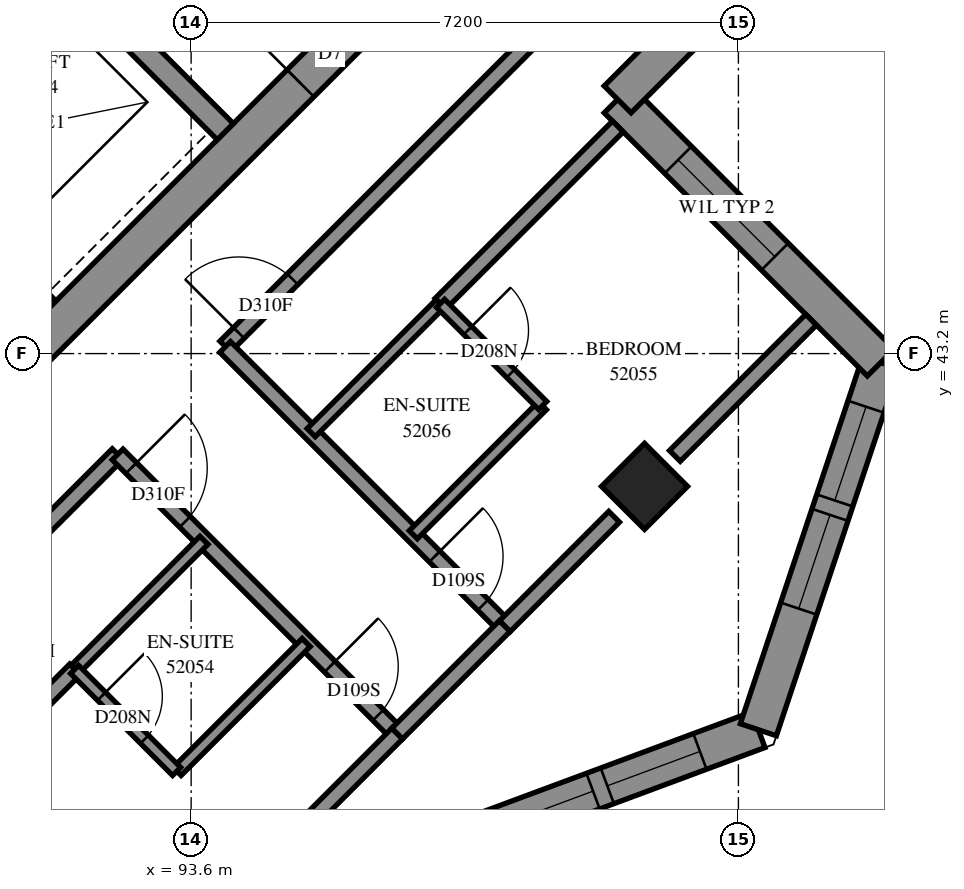
"""IFC4 building model, lengths in metres.
Left out: names, types, materials, properties, quantities, classifications, styles, units other than length and angle.
Written with IfcOpenShell. Run it as: python <this file> out.ifc"""

import sys

from ifc_helpers import new_model, si_unit, direction, frame, frame_2d, origin, origin_2d, place, context, subcontext, project, spatial, polyline, rectangle, outline, extrude, element, fill, save


model = new_model("IFC4")
c1 = context("Model", 3, precision=1e-05, world=origin(), true_north=direction((0.0, 1.0)))
c2 = subcontext(c1, "Body", "Model", "MODEL_VIEW")
j1 = project(units=[si_unit("LENGTHUNIT", "METRE"), si_unit("PLANEANGLEUNIT", "RADIAN")], contexts=[c1])
p1 = place(None, origin())
s1 = spatial("IfcSite", under=j1, at=p1, CompositionType="ELEMENT")
p2 = place(p1, origin())
s2 = spatial("IfcBuilding", under=s1, at=p2, CompositionType="ELEMENT")
p3 = place(p2, frame((0.0, 0.0, 193.0)))
s3 = spatial("IfcBuildingStorey", under=s2, at=p3, CompositionType="ELEMENT", Elevation=193.0)
p4 = place(p3, frame((99.565, 41.453, 0.0), z_axis=(0.0, 0.0, 1.0), x_axis=(0.7071067812, -0.7071067812, 0.0)))
e1 = element("IfcColumn", 1, at=p4, inside=s3, PredefinedType="COLUMN", context=c2, shape_type="SweptSolid", body=[
    extrude(rectangle(XDim=0.8, YDim=0.8, at=origin_2d()), origin(), (0.0, 0.0, 1.0), 3.1),
])
p5 = place(p3, frame((87.013, 38.731, -0.3), z_axis=(0.0, 0.0, 1.0), x_axis=(0.7071067812, 0.7071067812, 0.0)))
e2 = element("IfcWall", 2, at=p5, inside=s3, PredefinedType="SHEAR", context=c2, shape_type="SweptSolid", body=[
    extrude(rectangle(XDim=14.4, YDim=0.5, at=frame_2d((7.2, 0.0))), origin(), (0.0, 0.0, 1.0), 2.7),
])
p6 = place(p5, frame((4.55, 0.0, 0.3)))
e3 = element("IfcOpeningElement", 3, at=p6, cuts=e2, PredefinedType="OPENING", context=c2, shape_type="SweptSolid", body=[
    extrude(rectangle(XDim=1.1, YDim=2.1, at=frame_2d((0.55, 1.05))), frame((0.0, 0.26, 0.0), z_axis=(0.0, -1.0, 0.0), x_axis=(1.0, 0.0, 0.0)), (0.0, 0.0, 1.0), 0.52),
])
p7 = place(p5, frame((11.35, 0.0, 0.3)))
e4 = element("IfcOpeningElement", 4, at=p7, cuts=e2, PredefinedType="OPENING", context=c2, shape_type="SweptSolid", body=[
    extrude(rectangle(XDim=1.1, YDim=2.1, at=frame_2d((0.55, 1.05))), frame((0.0, 0.26, 0.0), z_axis=(0.0, -1.0, 0.0), x_axis=(1.0, 0.0, 0.0)), (0.0, 0.0, 1.0), 0.52),
])
p8 = place(p3, frame((81.534, 53.969, 0.0), z_axis=(0.0, 0.0, 1.0), x_axis=(0.707103309, -0.7071102534, 0.0)))
e5 = element("IfcWall", 5, at=p8, inside=s3, PredefinedType="SOLIDWALL", context=c2, shape_type="SweptSolid", body=[
    extrude(rectangle(XDim=14.4, YDim=0.3, at=frame_2d((7.2, 0.0))), origin(), (0.0, 0.0, 1.0), 3.1),
])
p9 = place(p8, frame((1.25, 0.0, 0.0)))
e6 = element("IfcOpeningElement", 6, at=p9, cuts=e5, PredefinedType="OPENING", context=c2, shape_type="SweptSolid", body=[
    extrude(rectangle(XDim=1.1, YDim=2.1, at=frame_2d((0.55, 1.05))), frame((0.0, 0.16, 0.0), z_axis=(0.0, -1.0, 0.0), x_axis=(1.0, 0.0, 0.0)), (0.0, 0.0, 1.0), 0.32),
])
p10 = place(p8, frame((4.85, 0.0, 0.0)))
e7 = element("IfcOpeningElement", 7, at=p10, cuts=e5, PredefinedType="OPENING", context=c2, shape_type="SweptSolid", body=[
    extrude(rectangle(XDim=1.1, YDim=2.1, at=frame_2d((0.55, 1.05))), frame((0.0, 0.16, 0.0), z_axis=(0.0, -1.0, 0.0), x_axis=(1.0, 0.0, 0.0)), (0.0, 0.0, 1.0), 0.32),
])
p11 = place(p8, frame((8.45, 0.0, 0.0)))
e8 = element("IfcOpeningElement", 8, at=p11, cuts=e5, PredefinedType="OPENING", context=c2, shape_type="SweptSolid", body=[
    extrude(rectangle(XDim=1.1, YDim=2.1, at=frame_2d((0.55, 1.05))), frame((0.0, 0.16, 0.0), z_axis=(0.0, -1.0, 0.0), x_axis=(1.0, 0.0, 0.0)), (0.0, 0.0, 1.0), 0.32),
])
p12 = place(p8, frame((12.05, 0.0, 0.0)))
e9 = element("IfcOpeningElement", 9, at=p12, cuts=e5, PredefinedType="OPENING", context=c2, shape_type="SweptSolid", body=[
    extrude(rectangle(XDim=1.1, YDim=2.1, at=frame_2d((0.55, 1.05))), frame((0.0, 0.16, 0.0), z_axis=(0.0, -1.0, 0.0), x_axis=(1.0, 0.0, 0.0)), (0.0, 0.0, 1.0), 0.32),
])
p13 = place(p3, frame((88.958, 51.211, 0.0), z_axis=(0.0, 0.0, 1.0), x_axis=(0.7070998367, -0.7071137256, 0.0)))
e10 = element("IfcWall", 10, at=p13, inside=s3, PredefinedType="SOLIDWALL", context=c2, shape_type="SweptSolid", body=[
    extrude(rectangle(XDim=7.2, YDim=0.3, at=frame_2d((3.6, 0.0))), origin(), (0.0, 0.0, 1.0), 3.1),
])
p14 = place(p3, frame((96.118, 36.415, 0.0), z_axis=(0.0, 0.0, 1.0), x_axis=(0.9374238577, 0.3481903374, 0.0)))
e11 = element("IfcWall", 11, at=p14, inside=s3, PredefinedType="SOLIDWALL", context=c2, shape_type="SweptSolid", body=[
    extrude(outline(polyline([(0.115, -0.25), (5.395, -0.25), (5.155, 0.25), (-0.115, 0.25), (0.115, -0.25)])), origin(), (0.0, 0.0, 1.0), 3.1),
])
p15 = place(p14, frame((1.655, 0.0, 0.45)))
e12 = element("IfcOpeningElement", 12, at=p15, cuts=e11, PredefinedType="OPENING", context=c2, shape_type="SweptSolid", body=[
    extrude(rectangle(XDim=1.3, YDim=2.5, at=frame_2d((0.65, 1.25))), frame((0.0, 0.26, 0.0), z_axis=(0.0, -1.0, 0.0), x_axis=(1.0, 0.0, 0.0)), (0.0, 0.0, 1.0), 0.52),
])
p16 = place(p14, frame((3.155, 0.0, 0.45)))
e13 = element("IfcOpeningElement", 13, at=p16, cuts=e11, PredefinedType="OPENING", context=c2, shape_type="SweptSolid", body=[
    extrude(rectangle(XDim=1.3, YDim=2.5, at=frame_2d((0.65, 1.25))), frame((0.0, 0.26, 0.0), z_axis=(0.0, -1.0, 0.0), x_axis=(1.0, 0.0, 0.0)), (0.0, 0.0, 1.0), 0.52),
])
p17 = place(p3, frame((101.062, 38.252, 0.0), z_axis=(0.0, 0.0, 1.0), x_axis=(0.3162395484, 0.9486793705, 0.0)))
e14 = element("IfcWall", 14, at=p17, inside=s3, PredefinedType="SOLIDWALL", context=c2, shape_type="SweptSolid", body=[
    extrude(outline(polyline([(-0.12, -0.25), (5.247, -0.25), (4.938, 0.25), (0.12, 0.25), (-0.12, -0.25)])), origin(), (0.0, 0.0, 1.0), 3.1),
])
p18 = place(p17, frame((1.68, 0.0, 0.45)))
e15 = element("IfcOpeningElement", 15, at=p18, cuts=e14, PredefinedType="OPENING", context=c2, shape_type="SweptSolid", body=[
    extrude(rectangle(XDim=1.3, YDim=2.5, at=frame_2d((0.65, 1.25))), frame((0.0, 0.26, 0.0), z_axis=(0.0, -1.0, 0.0), x_axis=(1.0, 0.0, 0.0)), (0.0, 0.0, 1.0), 0.52),
])
p19 = place(p17, frame((3.18, 0.0, 0.45)))
e16 = element("IfcOpeningElement", 16, at=p19, cuts=e14, PredefinedType="OPENING", context=c2, shape_type="SweptSolid", body=[
    extrude(rectangle(XDim=1.3, YDim=2.5, at=frame_2d((0.65, 1.25))), frame((0.0, 0.26, 0.0), z_axis=(0.0, -1.0, 0.0), x_axis=(1.0, 0.0, 0.0)), (0.0, 0.0, 1.0), 0.52),
])
p20 = place(p3, frame((102.673, 43.083, 0.0), z_axis=(0.0, 0.0, 1.0), x_axis=(-0.7071067812, 0.7071067812, 0.0)))
e17 = element("IfcWall", 17, at=p20, inside=s3, PredefinedType="SOLIDWALL", context=c2, shape_type="SweptSolid", body=[
    extrude(outline(polyline([(-0.154, -0.25), (4.646, -0.25), (5.146, 0.25), (0.154, 0.25), (-0.154, -0.25)])), origin(), (0.0, 0.0, 1.0), 3.1),
])
p21 = place(p20, frame((1.97, 0.0, 0.6)))
e18 = element("IfcOpeningElement", 18, at=p21, cuts=e17, PredefinedType="OPENING", context=c2, shape_type="SweptSolid", body=[
    extrude(rectangle(XDim=1.8, YDim=1.9, at=frame_2d((0.9, 0.95))), frame((0.0, 0.26, 0.0), z_axis=(0.0, -1.0, 0.0), x_axis=(1.0, 0.0, 0.0)), (0.0, 0.0, 1.0), 0.52),
])
p22 = place(p3, frame((99.211, 46.544, 0.0), z_axis=(0.0, 0.0, 1.0), x_axis=(0.7071156298, 0.7070979325, 0.0)))
e19 = element("IfcWall", 19, at=p22, inside=s3, PredefinedType="SOLIDWALL", context=c2, shape_type="SweptSolid", body=[
    extrude(outline(polyline([(0.25, -0.25), (5.98, -0.25), (5.321, 0.25), (-0.25, 0.25), (0.25, -0.25)])), origin(), (0.0, 0.0, 1.0), 3.1),
])
p23 = place(p22, frame((1.125, 0.0, 0.6)))
e20 = element("IfcOpeningElement", 20, at=p23, cuts=e19, PredefinedType="OPENING", context=c2, shape_type="SweptSolid", body=[
    extrude(rectangle(XDim=1.8, YDim=1.9, at=frame_2d((0.9, 0.95))), frame((0.0, 0.26, 0.0), z_axis=(0.0, -1.0, 0.0), x_axis=(1.0, 0.0, 0.0)), (0.0, 0.0, 1.0), 0.52),
])
p24 = place(p3, frame((84.976, 31.95, 0.0), z_axis=(0.0, 0.0, 1.0), x_axis=(0.7072313319, 0.7069822085, 0.0)))
e21 = element("IfcWall", 21, at=p24, inside=s3, PredefinedType="PARTITIONING", context=c2, shape_type="SweptSolid", body=[
    extrude(rectangle(XDim=10.035, YDim=0.2, at=frame_2d((5.018, 0.0))), origin(), (0.0, 0.0, 1.0), 3.1),
])
p25 = place(p3, frame((94.049, 43.293, 0.0), z_axis=(0.0, 0.0, 1.0), x_axis=(0.7071067812, 0.7071067812, 0.0)))
e22 = element("IfcWall", 22, at=p25, inside=s3, PredefinedType="PARTITIONING", context=c2, shape_type="SweptSolid", body=[
    extrude(rectangle(XDim=8.2, YDim=0.2, at=frame_2d((4.1, 0.0))), origin(), (0.0, 0.0, 1.0), 3.1),
])
p26 = place(p25, frame((0.252, 0.0, 0.0)))
e23 = element("IfcOpeningElement", 23, at=p26, cuts=e22, PredefinedType="OPENING", context=c2, shape_type="SweptSolid", body=[
    extrude(rectangle(XDim=1.0, YDim=2.1, at=frame_2d((0.5, 1.05))), frame((0.0, 0.11, 0.0), z_axis=(0.0, -1.0, 0.0), x_axis=(1.0, 0.0, 0.0)), (0.0, 0.0, 1.0), 0.22),
])
p27 = place(p3, frame((86.835, 36.079, 0.0), z_axis=(0.0, 0.0, 1.0), x_axis=(0.7071067812, 0.7071067812, 0.0)))
e24 = element("IfcWall", 24, at=p27, inside=s3, PredefinedType="PARTITIONING", context=c2, shape_type="SweptSolid", body=[
    extrude(rectangle(XDim=8.2, YDim=0.2, at=frame_2d((4.1, 0.0))), origin(), (0.0, 0.0, 1.0), 3.1),
])
p28 = place(p3, frame((94.047, 43.287, 0.0), z_axis=(0.0, 0.0, 1.0), x_axis=(0.7071067812, -0.7071067812, 0.0)))
e25 = element("IfcWall", 25, at=p28, inside=s3, PredefinedType="PARTITIONING", context=c2, shape_type="SweptSolid", body=[
    extrude(rectangle(XDim=5.199, YDim=0.2, at=frame_2d((2.599, 0.0))), origin(), (0.0, 0.0, 1.0), 3.1),
])
p29 = place(p28, frame((3.898, 0.0, 0.0)))
e26 = element("IfcOpeningElement", 26, at=p29, cuts=e25, PredefinedType="OPENING", context=c2, shape_type="SweptSolid", body=[
    extrude(rectangle(XDim=0.9, YDim=2.1, at=frame_2d((0.45, 1.05))), frame((0.0, 0.11, 0.0), z_axis=(0.0, -1.0, 0.0), x_axis=(1.0, 0.0, 0.0)), (0.0, 0.0, 1.0), 0.22),
])
p30 = place(p3, frame((92.633, 41.873, 0.0), z_axis=(0.0, 0.0, 1.0), x_axis=(0.7071067812, -0.7071067812, 0.0)))
e27 = element("IfcWall", 27, at=p30, inside=s3, PredefinedType="PARTITIONING", context=c2, shape_type="SweptSolid", body=[
    extrude(rectangle(XDim=5.199, YDim=0.2, at=frame_2d((2.599, 0.0))), origin(), (0.0, 0.0, 1.0), 3.1),
])
p31 = place(p30, frame((0.253, 0.0, 0.0)))
e28 = element("IfcOpeningElement", 28, at=p31, cuts=e27, PredefinedType="OPENING", context=c2, shape_type="SweptSolid", body=[
    extrude(rectangle(XDim=1.0, YDim=2.1, at=frame_2d((0.5, 1.05))), frame((0.0, 0.11, 0.0), z_axis=(0.0, -1.0, 0.0), x_axis=(1.0, 0.0, 0.0)), (0.0, 0.0, 1.0), 0.22),
])
p32 = place(p30, frame((3.948, 0.0, 0.0)))
e29 = element("IfcOpeningElement", 29, at=p32, cuts=e27, PredefinedType="OPENING", context=c2, shape_type="SweptSolid", body=[
    extrude(rectangle(XDim=0.9, YDim=2.1, at=frame_2d((0.45, 1.05))), frame((0.0, 0.11, 0.0), z_axis=(0.0, -1.0, 0.0), x_axis=(1.0, 0.0, 0.0)), (0.0, 0.0, 1.0), 0.22),
])
p33 = place(p3, frame((96.88, 43.856, 0.0), z_axis=(0.0, 0.0, 1.0), x_axis=(0.7074098182, 0.7068036142, 0.0)))
e30 = element("IfcWall", 30, at=p33, inside=s3, PredefinedType="PARTITIONING", context=c2, shape_type="SweptSolid", body=[
    extrude(rectangle(XDim=3.299, YDim=0.2, at=frame_2d((1.65, 0.0))), origin(), (0.0, 0.0, 1.0), 3.1),
])
p34 = place(p3, frame((99.964, 41.854, 0.0), z_axis=(0.0, 0.0, 1.0), x_axis=(0.7071265121, 0.7070870497, 0.0)))
e31 = element("IfcWall", 31, at=p34, inside=s3, PredefinedType="PARTITIONING", context=c2, shape_type="SweptSolid", body=[
    extrude(rectangle(XDim=2.534, YDim=0.2, at=frame_2d((1.267, 0.0))), origin(), (0.0, 0.0, 1.0), 3.1),
])
for number, where, z_axis, x_axis in (
    (32, (96.523, 40.817, 0.0), (0.0, 0.0, 1.0), (0.707, 0.707, 0.0)),
    (33, (95.179, 42.161, 0.0), (0.0, 0.0, 1.0), (0.707, 0.707, 0.0)),
):
    element("IfcWall", number, at=place(p3, frame(where, z_axis=z_axis, x_axis=x_axis)), inside=s3, PredefinedType="PARTITIONING", context=c2, shape_type="SweptSolid", body=[
        extrude(rectangle(XDim=2.401, YDim=0.15, at=frame_2d((1.201, 0.0))), origin(), (0.0, 0.0, 1.0), 3.1),
    ])
for number, where, z_axis, x_axis in (
    (34, (92.072, 39.046, 0.0), (0.0, 0.0, 1.0), (0.707, 0.708, 0.0)),
    (35, (93.415, 37.703, 0.0), (0.0, 0.0, 1.0), (0.708, 0.707, 0.0)),
):
    element("IfcWall", number, at=place(p3, frame(where, z_axis=z_axis, x_axis=x_axis)), inside=s3, PredefinedType="PARTITIONING", context=c2, shape_type="SweptSolid", body=[
        extrude(rectangle(XDim=2.4, YDim=0.15, at=frame_2d((1.2, 0.0))), origin(), (0.0, 0.0, 1.0), 3.1),
    ])
p35 = place(p3, frame((97.727, 39.613, 0.0), z_axis=(0.0, 0.0, 1.0), x_axis=(0.7066152229, 0.7075979979, 0.0)))
e36 = element("IfcWall", 36, at=p35, inside=s3, PredefinedType="PARTITIONING", context=c2, shape_type="SweptSolid", body=[
    extrude(rectangle(XDim=2.035, YDim=0.2, at=frame_2d((1.018, 0.0))), origin(), (0.0, 0.0, 1.0), 2.6),
])
p36 = place(p3, frame((94.873, 36.763, 0.0), z_axis=(0.0, 0.0, 1.0), x_axis=(0.7071067812, 0.7071067812, 0.0)))
e37 = element("IfcWall", 37, at=p36, inside=s3, PredefinedType="PARTITIONING", context=c2, shape_type="SweptSolid", body=[
    extrude(rectangle(XDim=2.034, YDim=0.2, at=frame_2d((1.017, 0.0))), origin(), (0.0, 0.0, 1.0), 2.6),
])
p37 = place(p3, frame((96.311, 38.201, 0.0), z_axis=(0.0, 0.0, 1.0), x_axis=(0.7071067812, 0.7071067812, 0.0)))
e38 = element("IfcWall", 38, at=p37, inside=s3, PredefinedType="PARTITIONING", context=c2, shape_type="SweptSolid", body=[
    extrude(rectangle(XDim=2.0, YDim=0.2, at=frame_2d((1.0, 0.0))), origin(), (0.0, 0.0, 1.0), 2.6),
])
p38 = place(p3, frame((96.881, 43.861, 0.0), z_axis=(0.0, 0.0, 1.0), x_axis=(0.7071067812, -0.7071067812, 0.0)))
e39 = element("IfcWall", 39, at=p38, inside=s3, PredefinedType="PARTITIONING", context=c2, shape_type="SweptSolid", body=[
    extrude(rectangle(XDim=1.901, YDim=0.15, at=frame_2d((0.95, 0.0))), origin(), (0.0, 0.0, 1.0), 3.1),
])
p39 = place(p38, frame((0.505, 0.0, 0.0)))
e40 = element("IfcOpeningElement", 40, at=p39, cuts=e39, PredefinedType="OPENING", context=c2, shape_type="SweptSolid", body=[
    extrude(rectangle(XDim=0.8, YDim=2.1, at=frame_2d((0.4, 1.05))), frame((0.0, 0.085, 0.0), z_axis=(0.0, -1.0, 0.0), x_axis=(1.0, 0.0, 0.0)), (0.0, 0.0, 1.0), 0.17),
])
p40 = place(p3, frame((92.067, 39.045, 0.0), z_axis=(0.0, 0.0, 1.0), x_axis=(0.7071067812, -0.7071067812, 0.0)))
e41 = element("IfcWall", 41, at=p40, inside=s3, PredefinedType="PARTITIONING", context=c2, shape_type="SweptSolid", body=[
    extrude(rectangle(XDim=1.898, YDim=0.15, at=frame_2d((0.949, 0.0))), origin(), (0.0, 0.0, 1.0), 3.1),
])
p41 = place(p40, frame((0.501, 0.0, 0.0)))
e42 = element("IfcOpeningElement", 42, at=p41, cuts=e41, PredefinedType="OPENING", context=c2, shape_type="SweptSolid", body=[
    extrude(rectangle(XDim=0.8, YDim=2.1, at=frame_2d((0.4, 1.05))), frame((0.0, 0.085, 0.0), z_axis=(0.0, -1.0, 0.0), x_axis=(1.0, 0.0, 0.0)), (0.0, 0.0, 1.0), 0.17),
])
p42 = place(p15, origin())
e43 = element("IfcWindow", 43, at=p42, inside=s3, PartitioningType="SINGLE_PANEL", PredefinedType="WINDOW", context=c2, shape_type="SweptSolid", body=[
    extrude(rectangle(XDim=1.3, YDim=2.5, at=frame_2d((0.65, 1.25))), frame((0.0, 0.18, 0.0), z_axis=(0.0, -1.0, 0.0), x_axis=(1.0, 0.0, 0.0)), (0.0, 0.0, 1.0), 0.06),
])
fill(e12, e43)
p43 = place(p16, origin())
e44 = element("IfcWindow", 44, at=p43, inside=s3, PartitioningType="SINGLE_PANEL", PredefinedType="WINDOW", context=c2, shape_type="SweptSolid", body=[
    extrude(rectangle(XDim=1.3, YDim=2.5, at=frame_2d((0.65, 1.25))), frame((0.0, 0.18, 0.0), z_axis=(0.0, -1.0, 0.0), x_axis=(1.0, 0.0, 0.0)), (0.0, 0.0, 1.0), 0.06),
])
fill(e13, e44)
p44 = place(p18, origin())
e45 = element("IfcWindow", 45, at=p44, inside=s3, PartitioningType="SINGLE_PANEL", PredefinedType="WINDOW", context=c2, shape_type="SweptSolid", body=[
    extrude(rectangle(XDim=1.3, YDim=2.5, at=frame_2d((0.65, 1.25))), frame((0.0, 0.18, 0.0), z_axis=(0.0, -1.0, 0.0), x_axis=(1.0, 0.0, 0.0)), (0.0, 0.0, 1.0), 0.06),
])
fill(e15, e45)
p45 = place(p19, origin())
e46 = element("IfcWindow", 46, at=p45, inside=s3, PartitioningType="SINGLE_PANEL", PredefinedType="WINDOW", context=c2, shape_type="SweptSolid", body=[
    extrude(rectangle(XDim=1.3, YDim=2.5, at=frame_2d((0.65, 1.25))), frame((0.0, 0.18, 0.0), z_axis=(0.0, -1.0, 0.0), x_axis=(1.0, 0.0, 0.0)), (0.0, 0.0, 1.0), 0.06),
])
fill(e16, e46)
p46 = place(p21, origin())
e47 = element("IfcWindow", 47, at=p46, inside=s3, PartitioningType="SINGLE_PANEL", PredefinedType="WINDOW", context=c2, shape_type="SweptSolid", body=[
    extrude(rectangle(XDim=1.8, YDim=1.9, at=frame_2d((0.9, 0.95))), frame((0.0, 0.18, 0.0), z_axis=(0.0, -1.0, 0.0), x_axis=(1.0, 0.0, 0.0)), (0.0, 0.0, 1.0), 0.06),
])
fill(e18, e47)
p47 = place(p7, origin())
e48 = element("IfcDoor", 48, at=p47, inside=s3, OperationType="SINGLE_SWING_RIGHT", PredefinedType="DOOR", context=c2, shape_type="SweptSolid", body=[
    extrude(rectangle(XDim=1.1, YDim=2.1, at=frame_2d((0.55, 1.05))), frame((0.0, 0.025, 0.0), z_axis=(0.0, -1.0, 0.0), x_axis=(1.0, 0.0, 0.0)), (0.0, 0.0, 1.0), 0.05),
])
fill(e4, e48)
p48 = place(p26, origin())
e49 = element("IfcDoor", 49, at=p48, inside=s3, OperationType="SINGLE_SWING_RIGHT", PredefinedType="DOOR", context=c2, shape_type="SweptSolid", body=[
    extrude(rectangle(XDim=1.0, YDim=2.1, at=frame_2d((0.5, 1.05))), frame((0.0, 0.025, 0.0), z_axis=(0.0, -1.0, 0.0), x_axis=(1.0, 0.0, 0.0)), (0.0, 0.0, 1.0), 0.05),
])
fill(e23, e49)
p49 = place(p31, origin())
e50 = element("IfcDoor", 50, at=p49, inside=s3, OperationType="SINGLE_SWING_RIGHT", PredefinedType="DOOR", context=c2, shape_type="SweptSolid", body=[
    extrude(rectangle(XDim=1.0, YDim=2.1, at=frame_2d((0.5, 1.05))), frame((0.0, 0.025, 0.0), z_axis=(0.0, -1.0, 0.0), x_axis=(1.0, 0.0, 0.0)), (0.0, 0.0, 1.0), 0.05),
])
fill(e28, e50)
p50 = place(p32, origin())
e51 = element("IfcDoor", 51, at=p50, inside=s3, OperationType="SINGLE_SWING_LEFT", PredefinedType="DOOR", context=c2, shape_type="SweptSolid", body=[
    extrude(rectangle(XDim=0.9, YDim=2.1, at=frame_2d((0.45, 1.05))), frame((0.0, 0.025, 0.0), z_axis=(0.0, -1.0, 0.0), x_axis=(1.0, 0.0, 0.0)), (0.0, 0.0, 1.0), 0.05),
])
fill(e29, e51)
p51 = place(p41, origin())
e52 = element("IfcDoor", 52, at=p51, inside=s3, OperationType="SINGLE_SWING_RIGHT", PredefinedType="DOOR", context=c2, shape_type="SweptSolid", body=[
    extrude(rectangle(XDim=0.8, YDim=2.1, at=frame_2d((0.4, 1.05))), frame((0.0, 0.025, 0.0), z_axis=(0.0, -1.0, 0.0), x_axis=(1.0, 0.0, 0.0)), (0.0, 0.0, 1.0), 0.05),
])
fill(e42, e52)
p52 = place(p29, origin())
e53 = element("IfcDoor", 53, at=p52, inside=s3, OperationType="SINGLE_SWING_RIGHT", PredefinedType="DOOR", context=c2, shape_type="SweptSolid", body=[
    extrude(rectangle(XDim=0.9, YDim=2.1, at=frame_2d((0.45, 1.05))), frame((0.0, 0.025, 0.0), z_axis=(0.0, -1.0, 0.0), x_axis=(1.0, 0.0, 0.0)), (0.0, 0.0, 1.0), 0.05),
])
fill(e26, e53)
p53 = place(p39, origin())
e54 = element("IfcDoor", 54, at=p53, inside=s3, OperationType="SINGLE_SWING_RIGHT", PredefinedType="DOOR", context=c2, shape_type="SweptSolid", body=[
    extrude(rectangle(XDim=0.8, YDim=2.1, at=frame_2d((0.4, 1.05))), frame((0.0, 0.025, 0.0), z_axis=(0.0, -1.0, 0.0), x_axis=(1.0, 0.0, 0.0)), (0.0, 0.0, 1.0), 0.05),
])
fill(e40, e54)
save(model, sys.argv[1])
